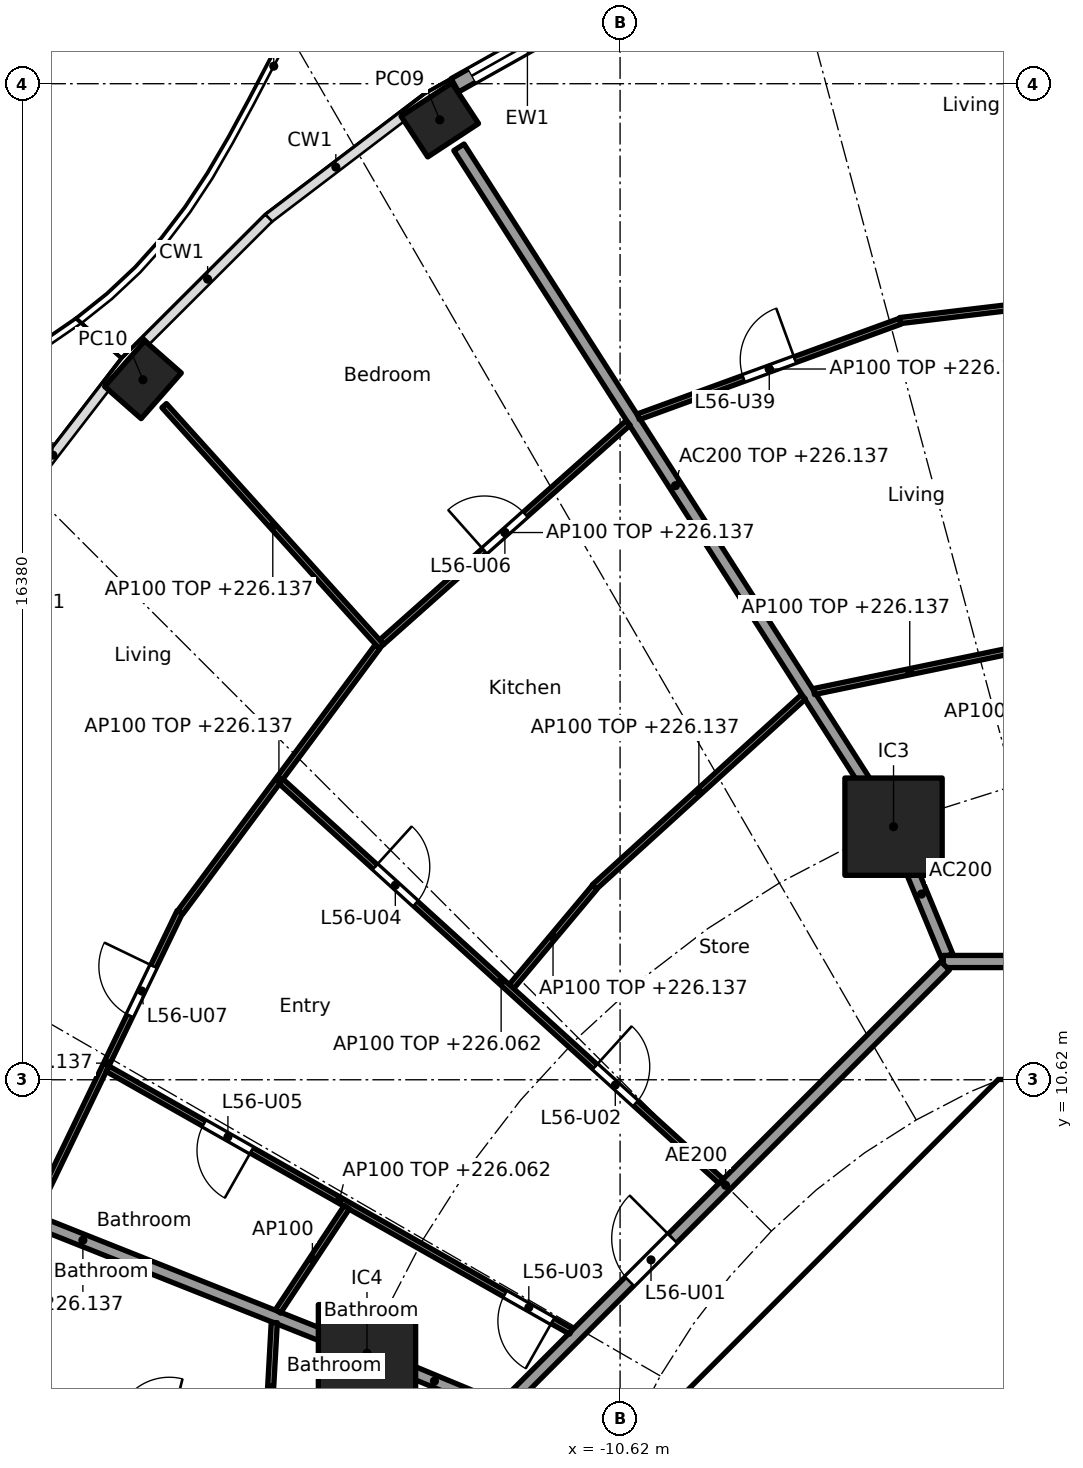
"""IFC4 building model, lengths in metres.
Left out: names, types, materials, properties, quantities, classifications, styles, units other than length and angle.
Written with IfcOpenShell. Run it as: python <this file> out.ifc"""

import sys

from ifc_helpers import new_model, si_unit, direction, frame, frame_2d, origin, origin_2d, place, context, subcontext, project, spatial, polyline, rectangle, hollow_rectangle, outline, extrude, element, fill, save


model = new_model("IFC4")
c1 = context("Model", 3, precision=1e-05, world=origin(), true_north=direction((0.0, 1.0)))
c2 = subcontext(c1, "Body", "Model", "MODEL_VIEW")
j1 = project(units=[si_unit("LENGTHUNIT", "METRE"), si_unit("PLANEANGLEUNIT", "RADIAN")], contexts=[c1])
p1 = place(None, origin())
s1 = spatial("IfcSite", under=j1, at=p1, CompositionType="ELEMENT")
p2 = place(p1, origin())
s2 = spatial("IfcBuilding", under=s1, at=p2, CompositionType="ELEMENT")
p3 = place(p2, frame((0.0, 0.0, 223.3)))
s3 = spatial("IfcBuildingStorey", under=s2, at=p3, CompositionType="ELEMENT", Elevation=223.3)
for number, where, z_axis, x_axis in (
    (1, (-13.585, 26.405, 0.0), (0.0, 0.0, 1.0), (-0.836, -0.549, 0.0)),
    (2, (-18.467, 22.132, 0.0), (0.0, 0.0, 1.0), (-0.66, -0.751, 0.0)),
):
    element("IfcColumn", number, at=place(p3, frame(where, z_axis=z_axis, x_axis=x_axis)), inside=s3, PredefinedType="COLUMN", context=c2, shape_type="SweptSolid", body=[
        extrude(hollow_rectangle(XDim=1.0, YDim=0.8, WallThickness=0.032, at=origin_2d()), origin(), (0.0, 0.0, 1.0), 3.7),
    ])
for number, where, z_axis, x_axis in (
    (3, (-6.123, 14.782, 0.0), (0.0, 0.0, 1.0), (1.0, 0.0, 0.0)),
    (4, (-14.782, 6.123, 0.0), (0.0, 0.0, 1.0), (1.0, 0.0, 0.0)),
):
    element("IfcColumn", number, at=place(p3, frame(where, z_axis=z_axis, x_axis=x_axis)), inside=s3, PredefinedType="COLUMN", context=c2, shape_type="SweptSolid", body=[
        extrude(rectangle(XDim=1.6, YDim=1.6, at=origin_2d()), origin(), (0.0, 0.0, 1.0), 3.7),
    ])
p4 = place(p3, frame((-13.338, 26.974, 0.0), z_axis=(0.0, 0.0, 1.0), x_axis=(0.872101280701, 0.489325409313, 0.0)))
e5 = element("IfcWall", 5, at=p4, inside=s3, PredefinedType="SOLIDWALL", context=c2, shape_type="SweptSolid", body=[
    extrude(rectangle(XDim=2.738, YDim=0.25, at=frame_2d((1.369, 0.0))), origin(), (0.0, 0.0, 1.0), 3.44),
])
p5 = place(p4, frame((0.319, 0.0, 0.0)))
e6 = element("IfcOpeningElement", 6, at=p5, cuts=e5, PredefinedType="OPENING", context=c2, shape_type="SweptSolid", body=[
    extrude(rectangle(XDim=2.1, YDim=2.4, at=frame_2d((1.05, 1.2))), frame((0.0, 0.135, 0.0), z_axis=(0.0, -1.0, 0.0), x_axis=(1.0, 0.0, 0.0)), (0.0, 0.0, 1.0), 0.27),
])
p6 = place(p3, frame((-4.613, 9.988, 0.0), z_axis=(0.0, 0.0, 1.0), x_axis=(-0.707106781187, -0.707106781187, 0.0)))
e7 = element("IfcWall", 7, at=p6, inside=s3, PredefinedType="SHEAR", context=c2, shape_type="SweptSolid", body=[
    extrude(rectangle(XDim=7.602, YDim=0.6, at=frame_2d((3.801, 0.0))), origin(), (0.0, 0.0, 1.0), 3.44),
])
p7 = place(p6, frame((0.351, 0.0, 0.0)))
e8 = element("IfcOpeningElement", 8, at=p7, cuts=e7, PredefinedType="OPENING", context=c2, shape_type="SweptSolid", body=[
    extrude(rectangle(XDim=1.1, YDim=2.1, at=frame_2d((0.55, 1.05))), frame((0.0, 0.31, 0.0), z_axis=(0.0, -1.0, 0.0), x_axis=(1.0, 0.0, 0.0)), (0.0, 0.0, 1.0), 0.62),
])
p8 = place(p3, frame((-6.2, 4.3, 0.0), z_axis=(0.0, 0.0, 1.0), x_axis=(0.0, 1.0, 0.0)))
e9 = element("IfcWall", 9, at=p8, inside=s3, PredefinedType="PARTITIONING", context=c2, shape_type="SweptSolid", body=[
    extrude(rectangle(XDim=3.527, YDim=0.15, at=frame_2d((1.763, 0.0))), origin(), (0.0, 0.0, 1.0), 3.44),
])
p9 = place(p8, frame((0.262, 0.0, 0.0)))
e10 = element("IfcOpeningElement", 10, at=p9, cuts=e9, PredefinedType="OPENING", context=c2, shape_type="SweptSolid", body=[
    extrude(rectangle(XDim=0.9, YDim=2.1, at=frame_2d((0.45, 1.05))), frame((0.0, 0.085, 0.0), z_axis=(0.0, -1.0, 0.0), x_axis=(1.0, 0.0, 0.0)), (0.0, 0.0, 1.0), 0.17),
])
p10 = place(p8, frame((2.138, 0.0, 0.0)))
e11 = element("IfcOpeningElement", 11, at=p10, cuts=e9, PredefinedType="OPENING", context=c2, shape_type="SweptSolid", body=[
    extrude(rectangle(XDim=0.9, YDim=2.1, at=frame_2d((0.45, 1.05))), frame((0.0, 0.085, 0.0), z_axis=(0.0, -1.0, 0.0), x_axis=(1.0, 0.0, 0.0)), (0.0, 0.0, 1.0), 0.17),
])
p11 = place(p3, origin())
e12 = element("IfcWall", 12, at=p11, inside=s3, PredefinedType="SHEAR", context=c2, shape_type="SweptSolid", body=[
    extrude(outline(polyline([(-4.152, 10.025), (-4.401, 9.776), (-4.825, 10.2), (-4.401, 10.625), (4.401, 10.625), (4.825, 10.2), (4.401, 9.776), (4.152, 10.025), (-4.152, 10.025)])), origin(), (0.0, 0.0, 1.0), 3.44),
])
p12 = place(p3, frame((-8.301, 5.8, 0.0), z_axis=(0.0, 0.0, 1.0), x_axis=(1.0, 0.0, 0.0)))
e13 = element("IfcWall", 13, at=p12, inside=s3, PredefinedType="PARTITIONING", context=c2, shape_type="SweptSolid", body=[
    extrude(rectangle(XDim=2.026, YDim=0.15, at=frame_2d((1.013, 0.0))), origin(), (0.0, 0.0, 1.0), 3.44),
])
p13 = place(p3, frame((-5.243, 12.657, 0.0), z_axis=(0.0, 0.0, 1.0), x_axis=(-0.382691608661, 0.923876145736, 0.0)))
e14 = element("IfcWall", 14, at=p13, inside=s3, PredefinedType="PARTITIONING", context=c2, shape_type="SweptSolid", body=[
    extrude(rectangle(XDim=2.2, YDim=0.2, at=frame_2d((1.1, 0.0))), origin(), (0.0, 0.0, 1.0), 3.44),
])
p14 = place(p3, frame((-6.15, 14.824, 0.0), z_axis=(0.0, 0.0, 1.0), x_axis=(-0.538870687577, 0.842388498301, 0.0)))
e15 = element("IfcWall", 15, at=p14, inside=s3, PredefinedType="PARTITIONING", context=c2, shape_type="SweptSolid", body=[
    extrude(rectangle(XDim=13.213, YDim=0.2, at=frame_2d((6.606, 0.0))), origin(), (0.0, 0.0, 1.0), 2.837),
])
p15 = place(p3, frame((-12.657, 5.243, 0.0), z_axis=(0.0, 0.0, 1.0), x_axis=(-0.923859888513, 0.38273085373, 0.0)))
e16 = element("IfcWall", 16, at=p15, inside=s3, PredefinedType="PARTITIONING", context=c2, shape_type="SweptSolid", body=[
    extrude(rectangle(XDim=2.199, YDim=0.2, at=frame_2d((1.1, 0.0))), origin(), (0.0, 0.0, 1.0), 3.44),
])
p16 = place(p3, frame((-14.829, 6.141, 0.0), z_axis=(0.0, 0.0, 1.0), x_axis=(-0.929202069098, 0.36957206981, 0.0)))
e17 = element("IfcWall", 17, at=p16, inside=s3, PredefinedType="PARTITIONING", context=c2, shape_type="SweptSolid", body=[
    extrude(rectangle(XDim=9.957, YDim=0.2, at=frame_2d((4.978, 0.0))), origin(), (0.0, 0.0, 1.0), 2.837),
])
p17 = place(p3, frame((5.104, 12.565, 0.0), z_axis=(0.0, 0.0, 1.0), x_axis=(-1.0, 0.0, 0.0)))
e18 = element("IfcWall", 18, at=p17, inside=s3, PredefinedType="PARTITIONING", context=c2, shape_type="SweptSolid", body=[
    extrude(rectangle(XDim=10.409, YDim=0.2, at=frame_2d((5.205, 0.0))), origin(), (0.0, 0.0, 1.0), 3.44),
])
p18 = place(p17, frame((3.303, 0.0, 0.0)))
e19 = element("IfcOpeningElement", 19, at=p18, cuts=e18, PredefinedType="OPENING", context=c2, shape_type="SweptSolid", body=[
    extrude(rectangle(XDim=1.0, YDim=2.1, at=frame_2d((0.5, 1.05))), frame((0.0, 0.11, 0.0), z_axis=(0.0, -1.0, 0.0), x_axis=(1.0, 0.0, 0.0)), (0.0, 0.0, 1.0), 0.22),
])
p19 = place(p3, frame((-5.275, 12.494, 0.0), z_axis=(0.0, 0.0, 1.0), x_axis=(-0.707106781187, -0.707106781187, 0.0)))
e20 = element("IfcWall", 20, at=p19, inside=s3, PredefinedType="PARTITIONING", context=c2, shape_type="SweptSolid", body=[
    extrude(rectangle(XDim=10.209, YDim=0.2, at=frame_2d((5.104, 0.0))), origin(), (0.0, 0.0, 1.0), 3.44),
])
p20 = place(p19, frame((6.339, 0.0, 0.0)))
e21 = element("IfcOpeningElement", 21, at=p20, cuts=e20, PredefinedType="OPENING", context=c2, shape_type="SweptSolid", body=[
    extrude(rectangle(XDim=1.0, YDim=2.1, at=frame_2d((0.5, 1.05))), frame((0.0, 0.11, 0.0), z_axis=(0.0, -1.0, 0.0), x_axis=(1.0, 0.0, 0.0)), (0.0, 0.0, 1.0), 0.22),
])
p21 = place(p3, frame((-1.166, 23.683, 0.0), z_axis=(0.0, 0.0, 1.0), x_axis=(-0.992961712415, -0.118435795593, 0.0)))
e22 = element("IfcWall", 22, at=p21, inside=s3, PredefinedType="PARTITIONING", context=c2, shape_type="SweptSolid", body=[
    extrude(rectangle(XDim=4.885, YDim=0.1, at=frame_2d((2.443, 0.0))), origin(), (0.0, 0.0, 1.0), 2.837),
])
p22 = place(p3, frame((-4.28, 17.657, 0.0), z_axis=(0.0, 0.0, 1.0), x_axis=(-0.979195545385, -0.202918909661, 0.0)))
e23 = element("IfcWall", 23, at=p22, inside=s3, PredefinedType="PARTITIONING", context=c2, shape_type="SweptSolid", body=[
    extrude(rectangle(XDim=3.221, YDim=0.1, at=frame_2d((1.61, 0.0))), origin(), (0.0, 0.0, 1.0), 2.837),
])
p23 = place(p3, frame((-6.014, 23.094, 0.0), z_axis=(0.0, 0.0, 1.0), x_axis=(-0.939433575811, -0.342731026665, 0.0)))
e24 = element("IfcWall", 24, at=p23, inside=s3, PredefinedType="PARTITIONING", context=c2, shape_type="SweptSolid", body=[
    extrude(rectangle(XDim=4.583, YDim=0.1, at=frame_2d((2.291, 0.0))), origin(), (0.0, 0.0, 1.0), 2.837),
])
p24 = place(p23, frame((1.841, 0.0, 0.0)))
e25 = element("IfcOpeningElement", 25, at=p24, cuts=e24, PredefinedType="OPENING", context=c2, shape_type="SweptSolid", body=[
    extrude(rectangle(XDim=0.9, YDim=2.1, at=frame_2d((0.45, 1.05))), frame((0.0, 0.06, 0.0), z_axis=(0.0, -1.0, 0.0), x_axis=(1.0, 0.0, 0.0)), (0.0, 0.0, 1.0), 0.12),
])
p25 = place(p3, frame((-7.605, 16.917, 0.0), z_axis=(0.0, 0.0, 1.0), x_axis=(-0.739828340504, -0.672795679673, 0.0)))
e26 = element("IfcWall", 26, at=p25, inside=s3, PredefinedType="PARTITIONING", context=c2, shape_type="SweptSolid", body=[
    extrude(rectangle(XDim=4.647, YDim=0.1, at=frame_2d((2.324, 0.0))), origin(), (0.0, 0.0, 1.0), 2.837),
])
p26 = place(p3, frame((-10.488, 21.422, 0.0), z_axis=(0.0, 0.0, 1.0), x_axis=(-0.747148551049, -0.664657086523, 0.0)))
e27 = element("IfcWall", 27, at=p26, inside=s3, PredefinedType="PARTITIONING", context=c2, shape_type="SweptSolid", body=[
    extrude(rectangle(XDim=5.425, YDim=0.1, at=frame_2d((2.712, 0.0))), origin(), (0.0, 0.0, 1.0), 2.837),
])
p27 = place(p26, frame((2.262, 0.0, 0.0)))
e28 = element("IfcOpeningElement", 28, at=p27, cuts=e27, PredefinedType="OPENING", context=c2, shape_type="SweptSolid", body=[
    extrude(rectangle(XDim=0.9, YDim=2.1, at=frame_2d((0.45, 1.05))), frame((0.0, 0.06, 0.0), z_axis=(0.0, -1.0, 0.0), x_axis=(1.0, 0.0, 0.0)), (0.0, 0.0, 1.0), 0.12),
])
p28 = place(p3, frame((-11.039, 13.785, 0.0), z_axis=(0.0, 0.0, 1.0), x_axis=(-0.642323585424, -0.766433566337, 0.0)))
e29 = element("IfcWall", 29, at=p28, inside=s3, PredefinedType="PARTITIONING", context=c2, shape_type="SweptSolid", body=[
    extrude(rectangle(XDim=2.13, YDim=0.1, at=frame_2d((1.065, 0.0))), origin(), (0.0, 0.0, 1.0), 2.837),
])
p29 = place(p3, frame((-14.545, 17.746, 0.0), z_axis=(0.0, 0.0, 1.0), x_axis=(-0.669829144173, 0.742515264232, 0.0)))
e30 = element("IfcWall", 30, at=p29, inside=s3, PredefinedType="PARTITIONING", context=c2, shape_type="SweptSolid", body=[
    extrude(rectangle(XDim=5.334, YDim=0.1, at=frame_2d((2.667, 0.0))), origin(), (0.0, 0.0, 1.0), 2.837),
])
p30 = place(p3, frame((-14.608, 17.743, 0.0), z_axis=(0.0, 0.0, 1.0), x_axis=(-0.596174489482, -0.8028548923, 0.0)))
e31 = element("IfcWall", 31, at=p30, inside=s3, PredefinedType="PARTITIONING", context=c2, shape_type="SweptSolid", body=[
    extrude(rectangle(XDim=5.442, YDim=0.1, at=frame_2d((2.721, 0.0))), origin(), (0.0, 0.0, 1.0), 2.837),
])
p31 = place(p3, frame((-8.959, 8.952, 0.0), z_axis=(0.0, 0.0, 1.0), x_axis=(-0.740140081805, 0.672452719011, 0.0)))
e32 = element("IfcWall", 32, at=p31, inside=s3, PredefinedType="PARTITIONING", context=c2, shape_type="SweptSolid", body=[
    extrude(rectangle(XDim=9.775, YDim=0.1, at=frame_2d((4.887, 0.0))), origin(), (0.0, 0.0, 1.0), 2.762),
])
p32 = place(p31, frame((1.901, 0.0, 0.0)))
e33 = element("IfcOpeningElement", 33, at=p32, cuts=e32, PredefinedType="OPENING", context=c2, shape_type="SweptSolid", body=[
    extrude(rectangle(XDim=0.9, YDim=2.1, at=frame_2d((0.45, 1.05))), frame((0.0, 0.06, 0.0), z_axis=(0.0, -1.0, 0.0), x_axis=(1.0, 0.0, 0.0)), (0.0, 0.0, 1.0), 0.12),
])
p33 = place(p31, frame((6.789, 0.0, 0.0)))
e34 = element("IfcOpeningElement", 34, at=p33, cuts=e32, PredefinedType="OPENING", context=c2, shape_type="SweptSolid", body=[
    extrude(rectangle(XDim=0.9, YDim=2.1, at=frame_2d((0.45, 1.05))), frame((0.0, 0.06, 0.0), z_axis=(0.0, -1.0, 0.0), x_axis=(1.0, 0.0, 0.0)), (0.0, 0.0, 1.0), 0.12),
])
p34 = place(p3, frame((-17.861, 13.379, 0.0), z_axis=(0.0, 0.0, 1.0), x_axis=(-0.434302390612, -0.900767136117, 0.0)))
e35 = element("IfcWall", 35, at=p34, inside=s3, PredefinedType="PARTITIONING", context=c2, shape_type="SweptSolid", body=[
    extrude(rectangle(XDim=5.519, YDim=0.1, at=frame_2d((2.759, 0.0))), origin(), (0.0, 0.0, 1.0), 2.837),
])
p35 = place(p34, frame((0.992, 0.0, 0.0)))
e36 = element("IfcOpeningElement", 36, at=p35, cuts=e35, PredefinedType="OPENING", context=c2, shape_type="SweptSolid", body=[
    extrude(rectangle(XDim=0.9, YDim=2.1, at=frame_2d((0.45, 1.05))), frame((0.0, 0.06, 0.0), z_axis=(0.0, -1.0, 0.0), x_axis=(1.0, 0.0, 0.0)), (0.0, 0.0, 1.0), 0.12),
])
p36 = place(p3, frame((-11.425, 6.48, 0.0), z_axis=(0.0, 0.0, 1.0), x_axis=(-0.869969596547, 0.493105365094, 0.0)))
e37 = element("IfcWall", 37, at=p36, inside=s3, PredefinedType="PARTITIONING", context=c2, shape_type="SweptSolid", body=[
    extrude(rectangle(XDim=8.762, YDim=0.1, at=frame_2d((4.381, 0.0))), origin(), (0.0, 0.0, 1.0), 2.762),
])
p37 = place(p36, frame((0.35, 0.0, 0.0)))
e38 = element("IfcOpeningElement", 38, at=p37, cuts=e37, PredefinedType="OPENING", context=c2, shape_type="SweptSolid", body=[
    extrude(rectangle(XDim=0.9, YDim=2.1, at=frame_2d((0.45, 1.05))), frame((0.0, 0.06, 0.0), z_axis=(0.0, -1.0, 0.0), x_axis=(1.0, 0.0, 0.0)), (0.0, 0.0, 1.0), 0.12),
])
p38 = place(p36, frame((6.038, 0.0, 0.0)))
e39 = element("IfcOpeningElement", 39, at=p38, cuts=e37, PredefinedType="OPENING", context=c2, shape_type="SweptSolid", body=[
    extrude(rectangle(XDim=0.9, YDim=2.1, at=frame_2d((0.45, 1.05))), frame((0.0, 0.06, 0.0), z_axis=(0.0, -1.0, 0.0), x_axis=(1.0, 0.0, 0.0)), (0.0, 0.0, 1.0), 0.12),
])
p39 = place(p3, frame((-15.114, 8.524, 0.0), z_axis=(0.0, 0.0, 1.0), x_axis=(-0.551211457161, -0.834365585037, 0.0)))
e40 = element("IfcWall", 40, at=p39, inside=s3, PredefinedType="PARTITIONING", context=c2, shape_type="SweptSolid", body=[
    extrude(rectangle(XDim=2.054, YDim=0.1, at=frame_2d((1.027, 0.0))), origin(), (0.0, 0.0, 1.0), 3.44),
])
p40 = place(p3, frame((-16.307, 6.627, 0.0), z_axis=(0.0, 0.0, 1.0), x_axis=(-0.055608865939, -0.998452629837, 0.0)))
e41 = element("IfcWall", 41, at=p40, inside=s3, PredefinedType="PARTITIONING", context=c2, shape_type="SweptSolid", body=[
    extrude(rectangle(XDim=2.143, YDim=0.1, at=frame_2d((1.071, 0.0))), origin(), (0.0, 0.0, 1.0), 2.837),
])
p41 = place(p5, origin())
e42 = element("IfcDoor", 42, at=p41, inside=s3, OperationType="SLIDING_TO_LEFT", PredefinedType="DOOR", context=c2, shape_type="SweptSolid", body=[
    extrude(rectangle(XDim=2.1, YDim=2.4, at=frame_2d((1.05, 1.2))), frame((0.0, 0.025, 0.0), z_axis=(0.0, -1.0, 0.0), x_axis=(1.0, 0.0, 0.0)), (0.0, 0.0, 1.0), 0.05),
])
fill(e6, e42)
p42 = place(p10, origin())
e43 = element("IfcDoor", 43, at=p42, inside=s3, OperationType="SINGLE_SWING_RIGHT", PredefinedType="DOOR", context=c2, shape_type="SweptSolid", body=[
    extrude(rectangle(XDim=0.9, YDim=2.1, at=frame_2d((0.45, 1.05))), frame((0.0, 0.025, 0.0), z_axis=(0.0, -1.0, 0.0), x_axis=(1.0, 0.0, 0.0)), (0.0, 0.0, 1.0), 0.05),
])
fill(e11, e43)
p43 = place(p7, origin())
e44 = element("IfcDoor", 44, at=p43, inside=s3, OperationType="SINGLE_SWING_LEFT", PredefinedType="DOOR", context=c2, shape_type="SweptSolid", body=[
    extrude(rectangle(XDim=1.1, YDim=2.1, at=frame_2d((0.55, 1.05))), frame((0.0, 0.025, 0.0), z_axis=(0.0, -1.0, 0.0), x_axis=(1.0, 0.0, 0.0)), (0.0, 0.0, 1.0), 0.05),
])
fill(e8, e44)
p44 = place(p20, frame((1.0, 0.0, 0.0), x_axis=(-1.0, 0.0, 0.0)))
e45 = element("IfcDoor", 45, at=p44, inside=s3, OperationType="SINGLE_SWING_RIGHT", PredefinedType="DOOR", context=c2, shape_type="SweptSolid", body=[
    extrude(rectangle(XDim=1.0, YDim=2.1, at=frame_2d((0.5, 1.05))), frame((0.0, 0.025, 0.0), z_axis=(0.0, -1.0, 0.0), x_axis=(1.0, 0.0, 0.0)), (0.0, 0.0, 1.0), 0.05),
])
fill(e21, e45)
p45 = place(p32, frame((0.9, 0.0, 0.0), x_axis=(-1.0, 0.0, 0.0)))
e46 = element("IfcDoor", 46, at=p45, inside=s3, OperationType="SINGLE_SWING_LEFT", PredefinedType="DOOR", context=c2, shape_type="SweptSolid", body=[
    extrude(rectangle(XDim=0.9, YDim=2.1, at=frame_2d((0.45, 1.05))), frame((0.0, 0.025, 0.0), z_axis=(0.0, -1.0, 0.0), x_axis=(1.0, 0.0, 0.0)), (0.0, 0.0, 1.0), 0.05),
])
fill(e33, e46)
p46 = place(p37, origin())
e47 = element("IfcDoor", 47, at=p46, inside=s3, OperationType="SINGLE_SWING_LEFT", PredefinedType="DOOR", context=c2, shape_type="SweptSolid", body=[
    extrude(rectangle(XDim=0.9, YDim=2.1, at=frame_2d((0.45, 1.05))), frame((0.0, 0.025, 0.0), z_axis=(0.0, -1.0, 0.0), x_axis=(1.0, 0.0, 0.0)), (0.0, 0.0, 1.0), 0.05),
])
fill(e38, e47)
p47 = place(p33, frame((0.9, 0.0, 0.0), x_axis=(-1.0, 0.0, 0.0)))
e48 = element("IfcDoor", 48, at=p47, inside=s3, OperationType="SINGLE_SWING_LEFT", PredefinedType="DOOR", context=c2, shape_type="SweptSolid", body=[
    extrude(rectangle(XDim=0.9, YDim=2.1, at=frame_2d((0.45, 1.05))), frame((0.0, 0.025, 0.0), z_axis=(0.0, -1.0, 0.0), x_axis=(1.0, 0.0, 0.0)), (0.0, 0.0, 1.0), 0.05),
])
fill(e34, e48)
p48 = place(p38, origin())
e49 = element("IfcDoor", 49, at=p48, inside=s3, OperationType="SINGLE_SWING_LEFT", PredefinedType="DOOR", context=c2, shape_type="SweptSolid", body=[
    extrude(rectangle(XDim=0.9, YDim=2.1, at=frame_2d((0.45, 1.05))), frame((0.0, 0.025, 0.0), z_axis=(0.0, -1.0, 0.0), x_axis=(1.0, 0.0, 0.0)), (0.0, 0.0, 1.0), 0.05),
])
fill(e39, e49)
p49 = place(p27, frame((0.9, 0.0, 0.0), x_axis=(-1.0, 0.0, 0.0)))
e50 = element("IfcDoor", 50, at=p49, inside=s3, OperationType="SINGLE_SWING_LEFT", PredefinedType="DOOR", context=c2, shape_type="SweptSolid", body=[
    extrude(rectangle(XDim=0.9, YDim=2.1, at=frame_2d((0.45, 1.05))), frame((0.0, 0.025, 0.0), z_axis=(0.0, -1.0, 0.0), x_axis=(1.0, 0.0, 0.0)), (0.0, 0.0, 1.0), 0.05),
])
fill(e28, e50)
p50 = place(p35, frame((0.9, 0.0, 0.0), x_axis=(-1.0, 0.0, 0.0)))
e51 = element("IfcDoor", 51, at=p50, inside=s3, OperationType="SINGLE_SWING_RIGHT", PredefinedType="DOOR", context=c2, shape_type="SweptSolid", body=[
    extrude(rectangle(XDim=0.9, YDim=2.1, at=frame_2d((0.45, 1.05))), frame((0.0, 0.025, 0.0), z_axis=(0.0, -1.0, 0.0), x_axis=(1.0, 0.0, 0.0)), (0.0, 0.0, 1.0), 0.05),
])
fill(e36, e51)
p51 = place(p24, frame((0.9, 0.0, 0.0), x_axis=(-1.0, 0.0, 0.0)))
e52 = element("IfcDoor", 52, at=p51, inside=s3, OperationType="SINGLE_SWING_RIGHT", PredefinedType="DOOR", context=c2, shape_type="SweptSolid", body=[
    extrude(rectangle(XDim=0.9, YDim=2.1, at=frame_2d((0.45, 1.05))), frame((0.0, 0.025, 0.0), z_axis=(0.0, -1.0, 0.0), x_axis=(1.0, 0.0, 0.0)), (0.0, 0.0, 1.0), 0.05),
])
fill(e25, e52)
save(model, sys.argv[1])
